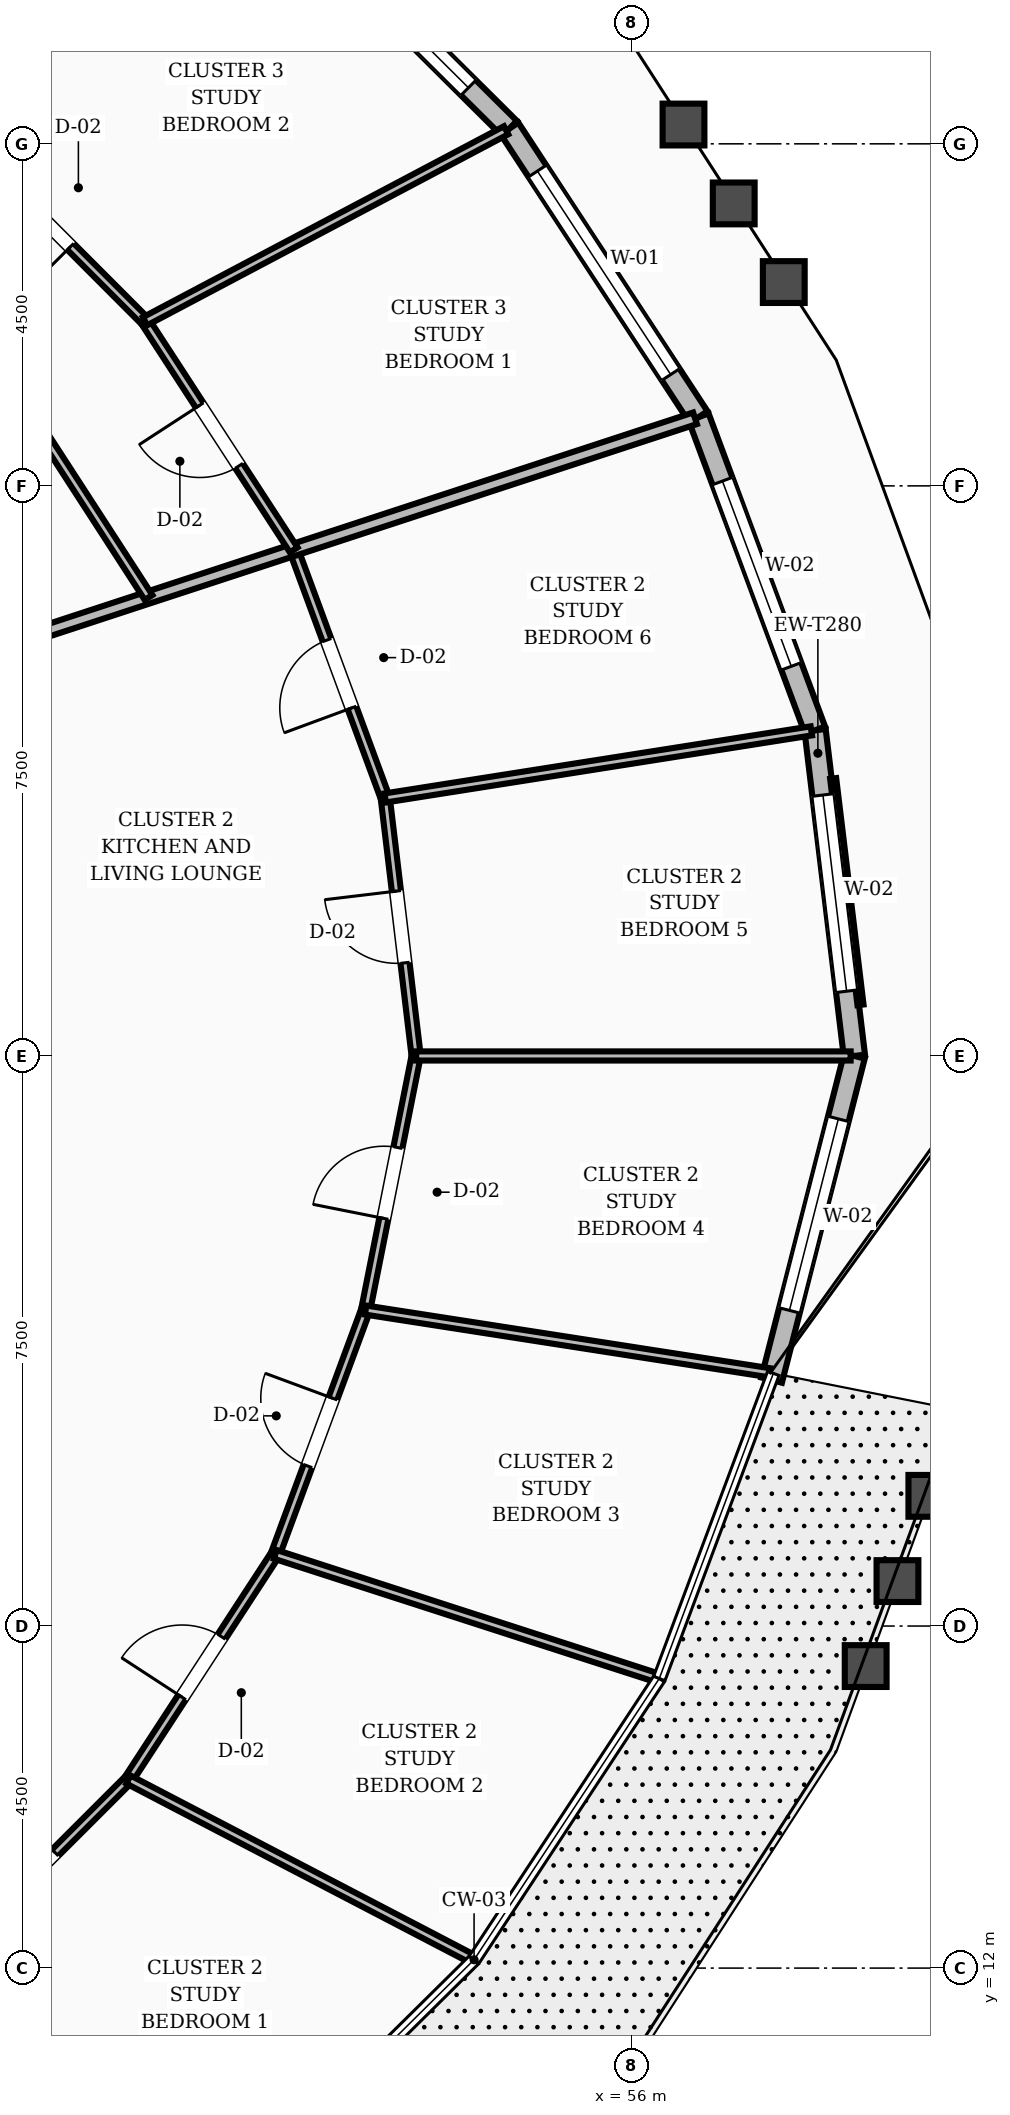
"""IFC4 building model, lengths in metres.
Left out: names, types, materials, properties, quantities, classifications, styles, units other than length and angle.
Written with IfcOpenShell. Run it as: python <this file> out.ifc"""

import sys

from ifc_helpers import new_model, si_unit, direction, frame, frame_2d, origin, place, context, subcontext, project, spatial, rectangle, extrude, element, fill, save


model = new_model("IFC4")
c1 = context("Model", 3, precision=1e-05, world=origin(), true_north=direction((0.0, 1.0)))
c2 = subcontext(c1, "Body", "Model", "MODEL_VIEW")
j1 = project(units=[si_unit("LENGTHUNIT", "METRE"), si_unit("PLANEANGLEUNIT", "RADIAN")], contexts=[c1])
p1 = place(None, origin())
s1 = spatial("IfcSite", under=j1, at=p1, CompositionType="ELEMENT")
p2 = place(p1, origin())
s2 = spatial("IfcBuilding", under=s1, at=p2, CompositionType="ELEMENT")
p3 = place(p2, frame((0.0, 0.0, 95.2)))
s3 = spatial("IfcBuildingStorey", under=s2, at=p3, CompositionType="ELEMENT", Elevation=95.2)
p4 = place(p3, frame((58.929, 24.0, 0.0), z_axis=(0.0, 0.0, 1.0), x_axis=(-0.119925904923, 0.992782845001, 0.0)))
e1 = element("IfcWall", 1, at=p4, inside=s3, PredefinedType="STANDARD", context=c2, shape_type="SweptSolid", body=[
    extrude(rectangle(XDim=4.316, YDim=0.28, at=frame_2d((2.158, 0.0))), origin(), (0.0, 0.0, 1.0), 2.71),
])
p5 = place(p4, frame((0.858, 0.0, 0.8)))
e2 = element("IfcOpeningElement", 2, at=p5, cuts=e1, PredefinedType="OPENING", context=c2, shape_type="SweptSolid", body=[
    extrude(rectangle(XDim=2.6, YDim=1.65, at=frame_2d((1.3, 0.825))), frame((0.0, 0.15, 0.0), z_axis=(0.0, -1.0, 0.0), x_axis=(1.0, 0.0, 0.0)), (0.0, 0.0, 1.0), 0.3),
])
p6 = place(p3, frame((58.412, 28.285, 0.0), z_axis=(0.0, 0.0, 1.0), x_axis=(-0.348632733014, 0.937259418449, 0.0)))
e3 = element("IfcWall", 3, at=p6, inside=s3, PredefinedType="STANDARD", context=c2, shape_type="SweptSolid", body=[
    extrude(rectangle(XDim=4.396, YDim=0.28, at=frame_2d((2.198, 0.0))), origin(), (0.0, 0.0, 1.0), 2.71),
])
p7 = place(p6, frame((0.898, 0.0, 0.8)))
e4 = element("IfcOpeningElement", 4, at=p7, cuts=e3, PredefinedType="OPENING", context=c2, shape_type="SweptSolid", body=[
    extrude(rectangle(XDim=2.6, YDim=1.65, at=frame_2d((1.3, 0.825))), frame((0.0, 0.15, 0.0), z_axis=(0.0, -1.0, 0.0), x_axis=(1.0, 0.0, 0.0)), (0.0, 0.0, 1.0), 0.3),
])
p8 = place(p3, frame((56.879, 32.405, 0.0), z_axis=(0.0, 0.0, 1.0), x_axis=(-0.548143021063, 0.836384617541, 0.0)))
e5 = element("IfcWall", 5, at=p8, inside=s3, PredefinedType="STANDARD", context=c2, shape_type="SweptSolid", body=[
    extrude(rectangle(XDim=4.54, YDim=0.28, at=frame_2d((2.27, 0.0))), origin(), (0.0, 0.0, 1.0), 2.71),
])
p9 = place(p8, frame((0.67, 0.0, 0.8)))
e6 = element("IfcOpeningElement", 6, at=p9, cuts=e5, PredefinedType="OPENING", context=c2, shape_type="SweptSolid", body=[
    extrude(rectangle(XDim=3.2, YDim=1.65, at=frame_2d((1.6, 0.825))), frame((0.0, 0.15, 0.0), z_axis=(0.0, -1.0, 0.0), x_axis=(1.0, 0.0, 0.0)), (0.0, 0.0, 1.0), 0.3),
])
p10 = place(p3, frame((54.391, 36.202, 0.0), z_axis=(0.0, 0.0, 1.0), x_axis=(-0.70930102543, 0.70490570669, 0.0)))
e7 = element("IfcWall", 7, at=p10, inside=s3, PredefinedType="STANDARD", context=c2, shape_type="SweptSolid", body=[
    extrude(rectangle(XDim=4.721, YDim=0.28, at=frame_2d((2.361, 0.0))), origin(), (0.0, 0.0, 1.0), 2.71),
])
p11 = place(p10, frame((0.761, 0.0, 0.8)))
e8 = element("IfcOpeningElement", 8, at=p11, cuts=e7, PredefinedType="OPENING", context=c2, shape_type="SweptSolid", body=[
    extrude(rectangle(XDim=3.2, YDim=1.65, at=frame_2d((1.6, 0.825))), frame((0.0, 0.15, 0.0), z_axis=(0.0, -1.0, 0.0), x_axis=(1.0, 0.0, 0.0)), (0.0, 0.0, 1.0), 0.3),
])
p12 = place(p3, frame((57.84, 19.736, 0.0), z_axis=(0.0, 0.0, 1.0), x_axis=(0.247557191203, 0.968873282263, 0.0)))
e9 = element("IfcWall", 9, at=p12, inside=s3, PredefinedType="STANDARD", context=c2, shape_type="SweptSolid", body=[
    extrude(rectangle(XDim=4.401, YDim=0.28, at=frame_2d((2.201, 0.0))), origin(), (0.0, 0.0, 1.0), 2.71),
])
p13 = place(p12, frame((0.947, 0.0, 0.8)))
e10 = element("IfcOpeningElement", 10, at=p13, cuts=e9, PredefinedType="OPENING", context=c2, shape_type="SweptSolid", body=[
    extrude(rectangle(XDim=2.6, YDim=1.65, at=frame_2d((1.3, 0.825))), frame((0.0, 0.15, 0.0), z_axis=(0.0, -1.0, 0.0), x_axis=(1.0, 0.0, 0.0)), (0.0, 0.0, 1.0), 0.3),
])
p14 = place(p3, frame((43.349, 14.56, 0.0), z_axis=(0.0, 0.0, 1.0), x_axis=(0.788377274066, -0.615192062478, 0.0)))
e11 = element("IfcWall", 11, at=p14, inside=s3, PredefinedType="SOLIDWALL", context=c2, shape_type="SweptSolid", body=[
    extrude(rectangle(XDim=9.205, YDim=0.16, at=frame_2d((4.603, 0.0))), origin(), (0.0, 0.0, 1.0), 2.71),
])
p15 = place(p3, frame((46.779, 11.884, 0.0), z_axis=(0.0, 0.0, 1.0), x_axis=(0.707472185224, 0.706741188226, 0.0)))
e12 = element("IfcWall", 12, at=p15, inside=s3, PredefinedType="PARTITIONING", context=c2, shape_type="SweptSolid", body=[
    extrude(rectangle(XDim=3.674, YDim=0.12, at=frame_2d((1.837, 0.0))), origin(), (0.0, 0.0, 1.0), 2.71),
])
p16 = place(p15, frame((1.362, 0.0, 0.0)))
e13 = element("IfcOpeningElement", 13, at=p16, cuts=e12, PredefinedType="OPENING", context=c2, shape_type="SweptSolid", body=[
    extrude(rectangle(XDim=0.95, YDim=2.1, at=frame_2d((0.475, 1.05))), frame((0.0, 0.07, 0.0), z_axis=(0.0, -1.0, 0.0), x_axis=(1.0, 0.0, 0.0)), (0.0, 0.0, 1.0), 0.14),
])
p17 = place(p3, frame((49.378, 14.48, 0.0), z_axis=(0.0, 0.0, 1.0), x_axis=(0.546147739328, 0.837688872331, 0.0)))
e14 = element("IfcWall", 14, at=p17, inside=s3, PredefinedType="PARTITIONING", context=c2, shape_type="SweptSolid", body=[
    extrude(rectangle(XDim=3.536, YDim=0.12, at=frame_2d((1.768, 0.0))), origin(), (0.0, 0.0, 1.0), 2.71),
])
p18 = place(p17, frame((1.293, 0.0, 0.0)))
e15 = element("IfcOpeningElement", 15, at=p18, cuts=e14, PredefinedType="OPENING", context=c2, shape_type="SweptSolid", body=[
    extrude(rectangle(XDim=0.95, YDim=2.1, at=frame_2d((0.475, 1.05))), frame((0.0, 0.07, 0.0), z_axis=(0.0, -1.0, 0.0), x_axis=(1.0, 0.0, 0.0)), (0.0, 0.0, 1.0), 0.14),
])
p19 = place(p3, frame((49.378, 14.48, 0.0), z_axis=(0.0, 0.0, 1.0), x_axis=(0.886712531702, -0.462321193677, 0.0)))
e16 = element("IfcWall", 16, at=p19, inside=s3, PredefinedType="PARTITIONING", context=c2, shape_type="SweptSolid", body=[
    extrude(rectangle(XDim=5.079, YDim=0.12, at=frame_2d((2.539, 0.0))), origin(), (0.0, 0.0, 1.0), 2.71),
])
p20 = place(p3, frame((51.309, 17.443, 0.0), z_axis=(0.0, 0.0, 1.0), x_axis=(0.346982565857, 0.937871579157, 0.0)))
e17 = element("IfcWall", 17, at=p20, inside=s3, PredefinedType="PARTITIONING", context=c2, shape_type="SweptSolid", body=[
    extrude(rectangle(XDim=3.427, YDim=0.12, at=frame_2d((1.714, 0.0))), origin(), (0.0, 0.0, 1.0), 2.71),
])
p21 = place(p20, frame((1.239, 0.0, 0.0)))
e18 = element("IfcOpeningElement", 18, at=p21, cuts=e17, PredefinedType="OPENING", context=c2, shape_type="SweptSolid", body=[
    extrude(rectangle(XDim=0.95, YDim=2.1, at=frame_2d((0.475, 1.05))), frame((0.0, 0.07, 0.0), z_axis=(0.0, -1.0, 0.0), x_axis=(1.0, 0.0, 0.0)), (0.0, 0.0, 1.0), 0.14),
])
p22 = place(p3, frame((51.309, 17.443, 0.0), z_axis=(0.0, 0.0, 1.0), x_axis=(0.951535233645, -0.307539752116, 0.0)))
e19 = element("IfcWall", 19, at=p22, inside=s3, PredefinedType="PARTITIONING", context=c2, shape_type="SweptSolid", body=[
    extrude(rectangle(XDim=5.26, YDim=0.12, at=frame_2d((2.63, 0.0))), origin(), (0.0, 0.0, 1.0), 2.71),
])
p23 = place(p3, frame((52.498, 20.657, 0.0), z_axis=(0.0, 0.0, 1.0), x_axis=(0.195055308321, 0.980792244411, 0.0)))
e20 = element("IfcWall", 20, at=p23, inside=s3, PredefinedType="PARTITIONING", context=c2, shape_type="SweptSolid", body=[
    extrude(rectangle(XDim=3.408, YDim=0.12, at=frame_2d((1.704, 0.0))), origin(), (0.0, 0.0, 1.0), 2.71),
])
p24 = place(p23, frame((1.229, 0.0, 0.0)))
e21 = element("IfcOpeningElement", 21, at=p24, cuts=e20, PredefinedType="OPENING", context=c2, shape_type="SweptSolid", body=[
    extrude(rectangle(XDim=0.95, YDim=2.1, at=frame_2d((0.475, 1.05))), frame((0.0, 0.07, 0.0), z_axis=(0.0, -1.0, 0.0), x_axis=(1.0, 0.0, 0.0)), (0.0, 0.0, 1.0), 0.14),
])
p25 = place(p3, frame((52.498, 20.657, 0.0), z_axis=(0.0, 0.0, 1.0), x_axis=(0.988166668321, -0.153383948379, 0.0)))
e22 = element("IfcWall", 22, at=p25, inside=s3, PredefinedType="PARTITIONING", context=c2, shape_type="SweptSolid", body=[
    extrude(rectangle(XDim=5.378, YDim=0.12, at=frame_2d((2.689, 0.0))), origin(), (0.0, 0.0, 1.0), 2.71),
])
p26 = place(p3, frame((53.163, 24.0, 0.0), z_axis=(0.0, 0.0, 1.0), x_axis=(-0.118908663781, 0.992905196722, 0.0)))
e23 = element("IfcWall", 23, at=p26, inside=s3, PredefinedType="PARTITIONING", context=c2, shape_type="SweptSolid", body=[
    extrude(rectangle(XDim=3.418, YDim=0.12, at=frame_2d((1.709, 0.0))), origin(), (0.0, 0.0, 1.0), 2.71),
])
p27 = place(p26, frame((1.234, 0.0, 0.0)))
e24 = element("IfcOpeningElement", 24, at=p27, cuts=e23, PredefinedType="OPENING", context=c2, shape_type="SweptSolid", body=[
    extrude(rectangle(XDim=0.95, YDim=2.1, at=frame_2d((0.475, 1.05))), frame((0.0, 0.07, 0.0), z_axis=(0.0, -1.0, 0.0), x_axis=(1.0, 0.0, 0.0)), (0.0, 0.0, 1.0), 0.14),
])
p28 = place(p3, frame((53.163, 24.0, 0.0), z_axis=(0.0, 0.0, 1.0), x_axis=(1.0, 0.0, 0.0)))
e25 = element("IfcWall", 25, at=p28, inside=s3, PredefinedType="PARTITIONING", context=c2, shape_type="SweptSolid", body=[
    extrude(rectangle(XDim=5.716, YDim=0.12, at=frame_2d((2.858, 0.0))), origin(), (0.0, 0.0, 1.0), 2.71),
])
p29 = place(p3, frame((52.757, 27.394, 0.0), z_axis=(0.0, 0.0, 1.0), x_axis=(-0.346219193067, 0.93815364965, 0.0)))
e26 = element("IfcWall", 26, at=p29, inside=s3, PredefinedType="PARTITIONING", context=c2, shape_type="SweptSolid", body=[
    extrude(rectangle(XDim=3.479, YDim=0.12, at=frame_2d((1.739, 0.0))), origin(), (0.0, 0.0, 1.0), 2.71),
])
p30 = place(p29, frame((1.264, 0.0, 0.0)))
e27 = element("IfcOpeningElement", 27, at=p30, cuts=e26, PredefinedType="OPENING", context=c2, shape_type="SweptSolid", body=[
    extrude(rectangle(XDim=0.95, YDim=2.1, at=frame_2d((0.475, 1.05))), frame((0.0, 0.07, 0.0), z_axis=(0.0, -1.0, 0.0), x_axis=(1.0, 0.0, 0.0)), (0.0, 0.0, 1.0), 0.14),
])
p31 = place(p3, frame((52.757, 27.394, 0.0), z_axis=(0.0, 0.0, 1.0), x_axis=(0.987831936488, 0.155525127407, 0.0)))
e28 = element("IfcWall", 28, at=p31, inside=s3, PredefinedType="PARTITIONING", context=c2, shape_type="SweptSolid", body=[
    extrude(rectangle(XDim=5.675, YDim=0.12, at=frame_2d((2.837, 0.0))), origin(), (0.0, 0.0, 1.0), 2.71),
])
p32 = place(p3, frame((46.828, 29.109, 0.0), z_axis=(0.0, 0.0, 1.0), x_axis=(0.950223350547, 0.311569549339, 0.0)))
e29 = element("IfcWall", 29, at=p32, inside=s3, PredefinedType="SOLIDWALL", context=c2, shape_type="SweptSolid", body=[
    extrude(rectangle(XDim=10.527, YDim=0.16, at=frame_2d((5.264, 0.0))), origin(), (0.0, 0.0, 1.0), 2.71),
])
p33 = place(p3, frame((49.643, 30.031, 0.0), z_axis=(0.0, 0.0, 1.0), x_axis=(-0.54354434096, 0.8393804557, 0.0)))
e30 = element("IfcWall", 30, at=p33, inside=s3, PredefinedType="PARTITIONING", context=c2, shape_type="SweptSolid", body=[
    extrude(rectangle(XDim=3.247, YDim=0.12, at=frame_2d((1.623, 0.0))), origin(), (0.0, 0.0, 1.0), 2.71),
])
p34 = place(p3, frame((51.552, 30.658, 0.0), z_axis=(0.0, 0.0, 1.0), x_axis=(-0.545100755876, 0.838370542149, 0.0)))
e31 = element("IfcWall", 31, at=p34, inside=s3, PredefinedType="PARTITIONING", context=c2, shape_type="SweptSolid", body=[
    extrude(rectangle(XDim=3.588, YDim=0.12, at=frame_2d((1.794, 0.0))), origin(), (0.0, 0.0, 1.0), 2.71),
])
p35 = place(p34, frame((1.319, 0.0, 0.0)))
e32 = element("IfcOpeningElement", 32, at=p35, cuts=e31, PredefinedType="OPENING", context=c2, shape_type="SweptSolid", body=[
    extrude(rectangle(XDim=0.95, YDim=2.1, at=frame_2d((0.475, 1.05))), frame((0.0, 0.07, 0.0), z_axis=(0.0, -1.0, 0.0), x_axis=(1.0, 0.0, 0.0)), (0.0, 0.0, 1.0), 0.14),
])
p36 = place(p3, frame((49.596, 33.666, 0.0), z_axis=(0.0, 0.0, 1.0), x_axis=(-0.706483909955, 0.70772910423, 0.0)))
e33 = element("IfcWall", 33, at=p36, inside=s3, PredefinedType="PARTITIONING", context=c2, shape_type="SweptSolid", body=[
    extrude(rectangle(XDim=3.725, YDim=0.12, at=frame_2d((1.863, 0.0))), origin(), (0.0, 0.0, 1.0), 2.71),
])
p37 = place(p36, frame((1.388, 0.0, 0.0)))
e34 = element("IfcOpeningElement", 34, at=p37, cuts=e33, PredefinedType="OPENING", context=c2, shape_type="SweptSolid", body=[
    extrude(rectangle(XDim=0.95, YDim=2.1, at=frame_2d((0.475, 1.05))), frame((0.0, 0.07, 0.0), z_axis=(0.0, -1.0, 0.0), x_axis=(1.0, 0.0, 0.0)), (0.0, 0.0, 1.0), 0.14),
])
p38 = place(p3, frame((49.596, 33.666, 0.0), z_axis=(0.0, 0.0, 1.0), x_axis=(0.883961363843, 0.467559950417, 0.0)))
e35 = element("IfcWall", 35, at=p38, inside=s3, PredefinedType="PARTITIONING", context=c2, shape_type="SweptSolid", body=[
    extrude(rectangle(XDim=5.374, YDim=0.12, at=frame_2d((2.687, 0.0))), origin(), (0.0, 0.0, 1.0), 2.71),
])
p39 = place(p3, frame((46.965, 36.302, 0.0), z_axis=(0.0, 0.0, 1.0), x_axis=(0.784054475927, 0.620692016042, 0.0)))
e36 = element("IfcWall", 36, at=p39, inside=s3, PredefinedType="PARTITIONING", context=c2, shape_type="SweptSolid", body=[
    extrude(rectangle(XDim=5.15, YDim=0.12, at=frame_2d((2.575, 0.0))), origin(), (0.0, 0.0, 1.0), 2.71),
])
p40 = place(p5, origin())
e37 = element("IfcWindow", 37, at=p40, inside=s3, PartitioningType="SINGLE_PANEL", PredefinedType="WINDOW", context=c2, shape_type="SweptSolid", body=[
    extrude(rectangle(XDim=2.6, YDim=1.65, at=frame_2d((1.3, 0.825))), frame((0.0, 0.03, 0.0), z_axis=(0.0, -1.0, 0.0), x_axis=(1.0, 0.0, 0.0)), (0.0, 0.0, 1.0), 0.06),
])
fill(e2, e37)
p41 = place(p7, origin())
e38 = element("IfcWindow", 38, at=p41, inside=s3, PartitioningType="SINGLE_PANEL", PredefinedType="WINDOW", context=c2, shape_type="SweptSolid", body=[
    extrude(rectangle(XDim=2.6, YDim=1.65, at=frame_2d((1.3, 0.825))), frame((0.0, 0.03, 0.0), z_axis=(0.0, -1.0, 0.0), x_axis=(1.0, 0.0, 0.0)), (0.0, 0.0, 1.0), 0.06),
])
fill(e4, e38)
p42 = place(p9, origin())
e39 = element("IfcWindow", 39, at=p42, inside=s3, PartitioningType="SINGLE_PANEL", PredefinedType="WINDOW", context=c2, shape_type="SweptSolid", body=[
    extrude(rectangle(XDim=3.2, YDim=1.65, at=frame_2d((1.6, 0.825))), frame((0.0, 0.03, 0.0), z_axis=(0.0, -1.0, 0.0), x_axis=(1.0, 0.0, 0.0)), (0.0, 0.0, 1.0), 0.06),
])
fill(e6, e39)
p43 = place(p11, origin())
e40 = element("IfcWindow", 40, at=p43, inside=s3, PartitioningType="SINGLE_PANEL", PredefinedType="WINDOW", context=c2, shape_type="SweptSolid", body=[
    extrude(rectangle(XDim=3.2, YDim=1.65, at=frame_2d((1.6, 0.825))), frame((0.0, 0.03, 0.0), z_axis=(0.0, -1.0, 0.0), x_axis=(1.0, 0.0, 0.0)), (0.0, 0.0, 1.0), 0.06),
])
fill(e8, e40)
p44 = place(p13, origin())
e41 = element("IfcWindow", 41, at=p44, inside=s3, PartitioningType="SINGLE_PANEL", PredefinedType="WINDOW", context=c2, shape_type="SweptSolid", body=[
    extrude(rectangle(XDim=2.6, YDim=1.65, at=frame_2d((1.3, 0.825))), frame((0.0, 0.03, 0.0), z_axis=(0.0, -1.0, 0.0), x_axis=(1.0, 0.0, 0.0)), (0.0, 0.0, 1.0), 0.06),
])
fill(e10, e41)
p45 = place(p16, origin())
e42 = element("IfcDoor", 42, at=p45, inside=s3, OperationType="SINGLE_SWING_RIGHT", PredefinedType="DOOR", context=c2, shape_type="SweptSolid", body=[
    extrude(rectangle(XDim=0.95, YDim=2.1, at=frame_2d((0.475, 1.05))), frame((0.0, 0.025, 0.0), z_axis=(0.0, -1.0, 0.0), x_axis=(1.0, 0.0, 0.0)), (0.0, 0.0, 1.0), 0.05),
])
fill(e13, e42)
p46 = place(p18, origin())
e43 = element("IfcDoor", 43, at=p46, inside=s3, OperationType="SINGLE_SWING_LEFT", PredefinedType="DOOR", context=c2, shape_type="SweptSolid", body=[
    extrude(rectangle(XDim=0.95, YDim=2.1, at=frame_2d((0.475, 1.05))), frame((0.0, 0.025, 0.0), z_axis=(0.0, -1.0, 0.0), x_axis=(1.0, 0.0, 0.0)), (0.0, 0.0, 1.0), 0.05),
])
fill(e15, e43)
p47 = place(p21, origin())
e44 = element("IfcDoor", 44, at=p47, inside=s3, OperationType="SINGLE_SWING_RIGHT", PredefinedType="DOOR", context=c2, shape_type="SweptSolid", body=[
    extrude(rectangle(XDim=0.95, YDim=2.1, at=frame_2d((0.475, 1.05))), frame((0.0, 0.025, 0.0), z_axis=(0.0, -1.0, 0.0), x_axis=(1.0, 0.0, 0.0)), (0.0, 0.0, 1.0), 0.05),
])
fill(e18, e44)
p48 = place(p24, origin())
e45 = element("IfcDoor", 45, at=p48, inside=s3, OperationType="SINGLE_SWING_LEFT", PredefinedType="DOOR", context=c2, shape_type="SweptSolid", body=[
    extrude(rectangle(XDim=0.95, YDim=2.1, at=frame_2d((0.475, 1.05))), frame((0.0, 0.025, 0.0), z_axis=(0.0, -1.0, 0.0), x_axis=(1.0, 0.0, 0.0)), (0.0, 0.0, 1.0), 0.05),
])
fill(e21, e45)
p49 = place(p27, origin())
e46 = element("IfcDoor", 46, at=p49, inside=s3, OperationType="SINGLE_SWING_RIGHT", PredefinedType="DOOR", context=c2, shape_type="SweptSolid", body=[
    extrude(rectangle(XDim=0.95, YDim=2.1, at=frame_2d((0.475, 1.05))), frame((0.0, 0.025, 0.0), z_axis=(0.0, -1.0, 0.0), x_axis=(1.0, 0.0, 0.0)), (0.0, 0.0, 1.0), 0.05),
])
fill(e24, e46)
p50 = place(p30, origin())
e47 = element("IfcDoor", 47, at=p50, inside=s3, OperationType="SINGLE_SWING_LEFT", PredefinedType="DOOR", context=c2, shape_type="SweptSolid", body=[
    extrude(rectangle(XDim=0.95, YDim=2.1, at=frame_2d((0.475, 1.05))), frame((0.0, 0.025, 0.0), z_axis=(0.0, -1.0, 0.0), x_axis=(1.0, 0.0, 0.0)), (0.0, 0.0, 1.0), 0.05),
])
fill(e27, e47)
p51 = place(p35, origin())
e48 = element("IfcDoor", 48, at=p51, inside=s3, OperationType="SINGLE_SWING_RIGHT", PredefinedType="DOOR", context=c2, shape_type="SweptSolid", body=[
    extrude(rectangle(XDim=0.95, YDim=2.1, at=frame_2d((0.475, 1.05))), frame((0.0, 0.025, 0.0), z_axis=(0.0, -1.0, 0.0), x_axis=(1.0, 0.0, 0.0)), (0.0, 0.0, 1.0), 0.05),
])
fill(e32, e48)
p52 = place(p37, origin())
e49 = element("IfcDoor", 49, at=p52, inside=s3, OperationType="SINGLE_SWING_LEFT", PredefinedType="DOOR", context=c2, shape_type="SweptSolid", body=[
    extrude(rectangle(XDim=0.95, YDim=2.1, at=frame_2d((0.475, 1.05))), frame((0.0, 0.025, 0.0), z_axis=(0.0, -1.0, 0.0), x_axis=(1.0, 0.0, 0.0)), (0.0, 0.0, 1.0), 0.05),
])
fill(e34, e49)
save(model, sys.argv[1])
